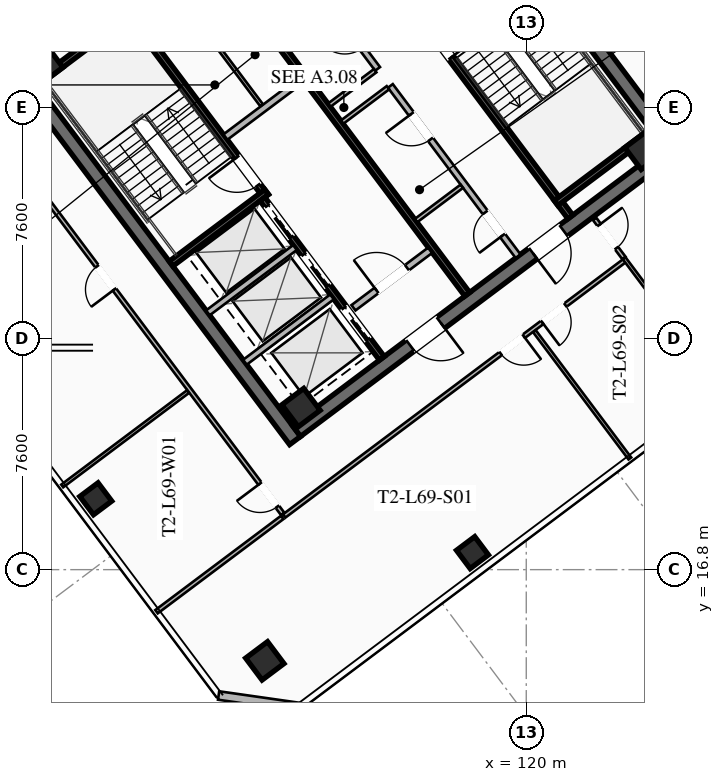
"""IFC4 building model, lengths in metres.
Left out: names, types, materials, properties, quantities, classifications, styles, units other than length and angle.
Written with IfcOpenShell. Run it as: python <this file> out.ifc"""

import sys

from ifc_helpers import new_model, si_unit, direction, frame, frame_2d, origin, origin_2d, place, context, subcontext, project, spatial, rectangle, hollow_rectangle, extrude, element, fill, save


model = new_model("IFC4")
c1 = context("Model", 3, precision=1e-05, world=origin(), true_north=direction((0.0, 1.0)))
c2 = subcontext(c1, "Body", "Model", "MODEL_VIEW")
j1 = project(units=[si_unit("LENGTHUNIT", "METRE"), si_unit("PLANEANGLEUNIT", "RADIAN")], contexts=[c1])
p1 = place(None, origin())
s1 = spatial("IfcSite", under=j1, at=p1, CompositionType="ELEMENT")
p2 = place(p1, origin())
s2 = spatial("IfcBuilding", under=s1, at=p2, CompositionType="ELEMENT")
p3 = place(p2, frame((0.0, 0.0, 255.4)))
s3 = spatial("IfcBuildingStorey", under=s2, at=p3, CompositionType="ELEMENT", Elevation=255.4)
for number, where, z_axis, x_axis in (
    (1, (112.396, 21.047, 0.0), (0.0, 0.0, 1.0), (-0.6, 0.8, 0.0)),
    (2, (115.604, 42.953, 0.0), (0.0, 0.0, 1.0), (0.6, -0.8, 0.0)),
):
    element("IfcWall", number, at=place(p3, frame(where, z_axis=z_axis, x_axis=x_axis)), inside=s3, PredefinedType="SHEAR", context=c2, shape_type="SweptSolid", body=[
        extrude(rectangle(XDim=15.6, YDim=0.45, at=frame_2d((7.8, 0.0))), origin(), (0.0, 0.0, 1.0), 4.0),
    ])
p4 = place(p3, frame((124.649, 30.518, 0.0), z_axis=(0.0, 0.0, 1.0), x_axis=(-0.8, -0.6, 0.0)))
e3 = element("IfcWall", 3, at=p4, inside=s3, PredefinedType="SHEAR", context=c2, shape_type="SweptSolid", body=[
    extrude(rectangle(XDim=15.26, YDim=0.45, at=frame_2d((7.63, 0.0))), origin(), (0.0, 0.0, 1.0), 4.0),
])
p5 = place(p4, frame((9.33, 0.0, 0.0)))
e4 = element("IfcOpeningElement", 4, at=p5, cuts=e3, PredefinedType="OPENING", context=c2, shape_type="SweptSolid", body=[
    extrude(rectangle(XDim=1.25, YDim=2.25, at=frame_2d((0.625, 1.125))), frame((0.0, 0.235, 0.0), z_axis=(0.0, -1.0, 0.0), x_axis=(1.0, 0.0, 0.0)), (0.0, 0.0, 1.0), 0.47),
])
p6 = place(p4, frame((4.28, 0.0, 0.0)))
e5 = element("IfcOpeningElement", 5, at=p6, cuts=e3, PredefinedType="OPENING", context=c2, shape_type="SweptSolid", body=[
    extrude(rectangle(XDim=1.25, YDim=2.25, at=frame_2d((0.625, 1.125))), frame((0.0, 0.235, 0.0), z_axis=(0.0, -1.0, 0.0), x_axis=(1.0, 0.0, 0.0)), (0.0, 0.0, 1.0), 0.47),
])
p7 = place(p3, frame((103.351, 33.482, 0.0), z_axis=(0.0, 0.0, 1.0), x_axis=(0.8, 0.6, 0.0)))
e6 = element("IfcWall", 6, at=p7, inside=s3, PredefinedType="SHEAR", context=c2, shape_type="SweptSolid", body=[
    extrude(rectangle(XDim=15.26, YDim=0.45, at=frame_2d((7.63, 0.0))), origin(), (0.0, 0.0, 1.0), 4.0),
])
p8 = place(p7, frame((4.68, 0.0, 0.0)))
e7 = element("IfcOpeningElement", 7, at=p8, cuts=e6, PredefinedType="OPENING", context=c2, shape_type="SweptSolid", body=[
    extrude(rectangle(XDim=1.25, YDim=2.25, at=frame_2d((0.625, 1.125))), frame((0.0, 0.235, 0.0), z_axis=(0.0, -1.0, 0.0), x_axis=(1.0, 0.0, 0.0)), (0.0, 0.0, 1.0), 0.47),
])
p9 = place(p7, frame((9.73, 0.0, 0.0)))
e8 = element("IfcOpeningElement", 8, at=p9, cuts=e6, PredefinedType="OPENING", context=c2, shape_type="SweptSolid", body=[
    extrude(rectangle(XDim=1.25, YDim=2.25, at=frame_2d((0.625, 1.125))), frame((0.0, 0.235, 0.0), z_axis=(0.0, -1.0, 0.0), x_axis=(1.0, 0.0, 0.0)), (0.0, 0.0, 1.0), 0.47),
])
for number, where, z_axis, x_axis in (
    (9, (112.59, 22.13, 0.0), (0.0, 0.0, 1.0), (0.8, 0.6, 0.0)),
    (10, (123.87, 30.59, 0.0), (0.0, 0.0, 1.0), (0.8, 0.6, 0.0)),
    (11, (104.13, 33.41, 0.0), (0.0, 0.0, 1.0), (0.8, 0.6, 0.0)),
    (12, (111.4, 13.8, 0.0), (0.0, 0.0, 1.0), (0.8, 0.6, 0.0)),
):
    element("IfcColumn", number, at=place(p3, frame(where, z_axis=z_axis, x_axis=x_axis)), inside=s3, PredefinedType="COLUMN", context=c2, shape_type="SweptSolid", body=[
        extrude(hollow_rectangle(XDim=0.9, YDim=0.9, WallThickness=0.04, at=origin_2d()), origin(), (0.0, 0.0, 1.0), 3.78),
    ])
for number, where, z_axis, x_axis in (
    (13, (118.23, 17.36, 0.0), (0.0, 0.0, 1.0), (0.8, 0.6, 0.0)),
    (14, (105.84, 19.13, 0.0), (0.0, 0.0, 1.0), (0.8, 0.6, 0.0)),
):
    element("IfcColumn", number, at=place(p3, frame(where, z_axis=z_axis, x_axis=x_axis)), inside=s3, PredefinedType="COLUMN", context=c2, shape_type="SweptSolid", body=[
        extrude(hollow_rectangle(XDim=0.75, YDim=0.75, WallThickness=0.032, at=origin_2d()), origin(), (0.0, 0.0, 1.0), 3.78),
    ])
p10 = place(p3, frame((112.54, 12.28, 0.0), z_axis=(0.0, 0.0, 1.0), x_axis=(-0.989956760759, 0.141370477216, 0.0)))
e15 = element("IfcWall", 15, at=p10, inside=s3, PredefinedType="SOLIDWALL", context=c2, shape_type="SweptSolid", body=[
    extrude(rectangle(XDim=2.687, YDim=0.28, at=frame_2d((1.344, 0.0))), origin(), (0.0, 0.0, 1.0), 3.78),
])
p11 = place(p3, frame((111.44, 29.08, 0.0), z_axis=(0.0, 0.0, 1.0), x_axis=(-0.59999041401, 0.800007189403, 0.0)))
e16 = element("IfcWall", 16, at=p11, inside=s3, PredefinedType="SHEAR", context=c2, shape_type="SweptSolid", body=[
    extrude(rectangle(XDim=8.15, YDim=0.2, at=frame_2d((4.075, 0.0))), origin(), (0.0, 0.0, 1.0), 3.78),
])
p12 = place(p11, frame((0.45, 0.0, 0.0)))
e17 = element("IfcOpeningElement", 17, at=p12, cuts=e16, PredefinedType="OPENING", context=c2, shape_type="SweptSolid", body=[
    extrude(rectangle(XDim=1.15, YDim=2.2, at=frame_2d((0.575, 1.1))), frame((0.0, 0.11, 0.0), z_axis=(0.0, -1.0, 0.0), x_axis=(1.0, 0.0, 0.0)), (0.0, 0.0, 1.0), 0.22),
])
for number, where, z_axis, x_axis in (
    (18, (108.316, 26.862, 0.0), (0.0, 0.0, 1.0), (0.8, 0.6, 0.0)),
    (19, (103.876, 32.782, 0.0), (0.0, 0.0, 1.0), (0.8, 0.6, 0.0)),
):
    element("IfcWall", number, at=place(p3, frame(where, z_axis=z_axis, x_axis=x_axis)), inside=s3, PredefinedType="SHEAR", context=c2, shape_type="SweptSolid", body=[
        extrude(rectangle(XDim=3.93, YDim=0.2, at=frame_2d((1.965, 0.0))), origin(), (0.0, 0.0, 1.0), 3.78),
    ])
p13 = place(p3, frame((116.56, 34.92, 0.0), z_axis=(0.0, 0.0, 1.0), x_axis=(0.59999041401, -0.800007189403, 0.0)))
e20 = element("IfcWall", 20, at=p13, inside=s3, PredefinedType="SHEAR", context=c2, shape_type="SweptSolid", body=[
    extrude(rectangle(XDim=8.15, YDim=0.2, at=frame_2d((4.075, 0.0))), origin(), (0.0, 0.0, 1.0), 3.78),
])
p14 = place(p13, frame((0.45, 0.0, 0.0)))
e21 = element("IfcOpeningElement", 21, at=p14, cuts=e20, PredefinedType="OPENING", context=c2, shape_type="SweptSolid", body=[
    extrude(rectangle(XDim=1.15, YDim=2.2, at=frame_2d((0.575, 1.1))), frame((0.0, 0.11, 0.0), z_axis=(0.0, -1.0, 0.0), x_axis=(1.0, 0.0, 0.0)), (0.0, 0.0, 1.0), 0.22),
])
p15 = place(p3, frame((120.98, 28.86, 0.0), z_axis=(0.0, 0.0, 1.0), x_axis=(0.800014909178, 0.599980120581, 0.0)))
e22 = element("IfcWall", 22, at=p15, inside=s3, PredefinedType="SHEAR", context=c2, shape_type="SweptSolid", body=[
    extrude(rectangle(XDim=3.93, YDim=0.2, at=frame_2d((1.965, 0.0))), origin(), (0.0, 0.0, 1.0), 3.78),
])
p16 = place(p3, frame((118.058, 25.856, 0.0), z_axis=(0.0, 0.0, 1.0), x_axis=(-0.600002657301, 0.799998007018, 0.0)))
e23 = element("IfcWall", 23, at=p16, inside=s3, PredefinedType="SHEAR", context=c2, shape_type="SweptSolid", body=[
    extrude(rectangle(XDim=14.7, YDim=0.2, at=frame_2d((7.35, 0.0))), origin(), (0.0, 0.0, 1.0), 3.78),
])
p17 = place(p3, frame((110.104, 31.028, 0.0), z_axis=(0.0, 0.0, 1.0), x_axis=(0.800018601094, 0.59997519774, 0.0)))
e24 = element("IfcWall", 24, at=p17, inside=s3, PredefinedType="SOLIDWALL", context=c2, shape_type="SweptSolid", body=[
    extrude(rectangle(XDim=3.15, YDim=0.22, at=frame_2d((1.575, 0.0))), origin(), (0.0, 0.0, 1.0), 2.971),
])
p18 = place(p3, frame((114.316, 25.412, 0.0), z_axis=(0.0, 0.0, 1.0), x_axis=(0.800018601094, 0.59997519774, 0.0)))
e25 = element("IfcWall", 25, at=p18, inside=s3, PredefinedType="SOLIDWALL", context=c2, shape_type="SweptSolid", body=[
    extrude(rectangle(XDim=3.15, YDim=0.22, at=frame_2d((1.575, 0.0))), origin(), (0.0, 0.0, 1.0), 2.971),
])
p19 = place(p18, frame((0.95, 0.0, 0.0)))
e26 = element("IfcOpeningElement", 26, at=p19, cuts=e25, PredefinedType="OPENING", context=c2, shape_type="SweptSolid", body=[
    extrude(rectangle(XDim=1.25, YDim=2.25, at=frame_2d((0.625, 1.125))), frame((0.0, 0.12, 0.0), z_axis=(0.0, -1.0, 0.0), x_axis=(1.0, 0.0, 0.0)), (0.0, 0.0, 1.0), 0.24),
])
p20 = place(p3, frame((115.25, 23.75, 0.0), z_axis=(0.0, 0.0, 1.0), x_axis=(-0.599994036198, 0.800004472816, 0.0)))
e27 = element("IfcWall", 27, at=p20, inside=s3, PredefinedType="SHEAR", context=c2, shape_type="SweptSolid", body=[
    extrude(rectangle(XDim=6.55, YDim=0.2, at=frame_2d((3.275, 0.0))), origin(), (0.0, 0.0, 1.0), 3.78),
])
p21 = place(p20, frame((4.975, 0.0, 0.0)))
e28 = element("IfcOpeningElement", 28, at=p21, cuts=e27, PredefinedType="OPENING", context=c2, shape_type="SweptSolid", body=[
    extrude(rectangle(XDim=1.3, YDim=2.25, at=frame_2d((0.65, 1.125))), frame((0.0, 0.11, 0.0), z_axis=(0.0, -1.0, 0.0), x_axis=(1.0, 0.0, 0.0)), (0.0, 0.0, 1.0), 0.22),
])
p22 = place(p20, frame((2.975, 0.0, 0.0)))
e29 = element("IfcOpeningElement", 29, at=p22, cuts=e27, PredefinedType="OPENING", context=c2, shape_type="SweptSolid", body=[
    extrude(rectangle(XDim=1.3, YDim=2.25, at=frame_2d((0.65, 1.125))), frame((0.0, 0.11, 0.0), z_axis=(0.0, -1.0, 0.0), x_axis=(1.0, 0.0, 0.0)), (0.0, 0.0, 1.0), 0.22),
])
p23 = place(p20, frame((0.775, 0.0, 0.0)))
e30 = element("IfcOpeningElement", 30, at=p23, cuts=e27, PredefinedType="OPENING", context=c2, shape_type="SweptSolid", body=[
    extrude(rectangle(XDim=1.3, YDim=2.25, at=frame_2d((0.65, 1.125))), frame((0.0, 0.11, 0.0), z_axis=(0.0, -1.0, 0.0), x_axis=(1.0, 0.0, 0.0)), (0.0, 0.0, 1.0), 0.22),
])
for number, where, z_axis, x_axis in (
    (31, (110.746, 23.622, 0.0), (0.0, 0.0, 1.0), (0.8, 0.6, 0.0)),
    (32, (109.528, 25.246, 0.0), (0.0, 0.0, 1.0), (0.8, 0.6, 0.0)),
):
    element("IfcWall", number, at=place(p3, frame(where, z_axis=z_axis, x_axis=x_axis)), inside=s3, PredefinedType="SOLIDWALL", context=c2, shape_type="SweptSolid", body=[
        extrude(rectangle(XDim=3.58, YDim=0.2, at=frame_2d((1.79, 0.0))), origin(), (0.0, 0.0, 1.0), 3.78),
    ])
p24 = place(p3, frame((111.296, 32.072, 0.0), z_axis=(0.0, 0.0, 1.0), x_axis=(-0.59995887973, 0.800030838552, 0.0)))
e33 = element("IfcWall", 33, at=p24, inside=s3, PredefinedType="PARTITIONING", context=c2, shape_type="SweptSolid", body=[
    extrude(rectangle(XDim=3.8, YDim=0.11, at=frame_2d((1.9, 0.0))), origin(), (0.0, 0.0, 1.0), 2.971),
])
p25 = place(p3, frame((119.73, 27.11, 0.0), z_axis=(0.0, 0.0, 1.0), x_axis=(-0.600005580459, 0.799995814625, 0.0)))
e34 = element("IfcWall", 34, at=p25, inside=s3, PredefinedType="SOLIDWALL", context=c2, shape_type="SweptSolid", body=[
    extrude(rectangle(XDim=7.0, YDim=0.2, at=frame_2d((3.5, 0.0))), origin(), (0.0, 0.0, 1.0), 2.971),
])
p26 = place(p25, frame((0.85, 0.0, 0.0)))
e35 = element("IfcOpeningElement", 35, at=p26, cuts=e34, PredefinedType="OPENING", context=c2, shape_type="SweptSolid", body=[
    extrude(rectangle(XDim=0.95, YDim=2.05, at=frame_2d((0.475, 1.025))), frame((0.0, 0.11, 0.0), z_axis=(0.0, -1.0, 0.0), x_axis=(1.0, 0.0, 0.0)), (0.0, 0.0, 1.0), 0.22),
])
p27 = place(p25, frame((4.8, 0.0, 0.0)))
e36 = element("IfcOpeningElement", 36, at=p27, cuts=e34, PredefinedType="OPENING", context=c2, shape_type="SweptSolid", body=[
    extrude(rectangle(XDim=1.05, YDim=2.2, at=frame_2d((0.525, 1.1))), frame((0.0, 0.11, 0.0), z_axis=(0.0, -1.0, 0.0), x_axis=(1.0, 0.0, 0.0)), (0.0, 0.0, 1.0), 0.22),
])
for number, where, z_axis, x_axis in (
    (37, (113.946, 31.522, 0.0), (0.0, 0.0, 1.0), (0.8, 0.6, 0.0)),
    (38, (116.376, 28.282, 0.0), (0.0, 0.0, 1.0), (0.8, 0.6, 0.0)),
):
    element("IfcWall", number, at=place(p3, frame(where, z_axis=z_axis, x_axis=x_axis)), inside=s3, PredefinedType="PARTITIONING", context=c2, shape_type="SweptSolid", body=[
        extrude(rectangle(XDim=1.88, YDim=0.135, at=frame_2d((0.94, 0.0))), origin(), (0.0, 0.0, 1.0), 2.971),
    ])
p28 = place(p3, frame((115.11, 33.27, 0.0), z_axis=(0.0, 0.0, 1.0), x_axis=(-0.600011160345, 0.79999162962, 0.0)))
e39 = element("IfcWall", 39, at=p28, inside=s3, PredefinedType="SOLIDWALL", context=c2, shape_type="SweptSolid", body=[
    extrude(rectangle(XDim=7.0, YDim=0.2, at=frame_2d((3.5, 0.0))), origin(), (0.0, 0.0, 1.0), 2.971),
])
p29 = place(p28, frame((0.85, 0.0, 0.0)))
e40 = element("IfcOpeningElement", 40, at=p29, cuts=e39, PredefinedType="OPENING", context=c2, shape_type="SweptSolid", body=[
    extrude(rectangle(XDim=0.95, YDim=2.05, at=frame_2d((0.475, 1.025))), frame((0.0, 0.11, 0.0), z_axis=(0.0, -1.0, 0.0), x_axis=(1.0, 0.0, 0.0)), (0.0, 0.0, 1.0), 0.22),
])
p30 = place(p28, frame((4.85, 0.0, 0.0)))
e41 = element("IfcOpeningElement", 41, at=p30, cuts=e39, PredefinedType="OPENING", context=c2, shape_type="SweptSolid", body=[
    extrude(rectangle(XDim=0.95, YDim=2.05, at=frame_2d((0.475, 1.025))), frame((0.0, 0.11, 0.0), z_axis=(0.0, -1.0, 0.0), x_axis=(1.0, 0.0, 0.0)), (0.0, 0.0, 1.0), 0.22),
])
p31 = place(p3, frame((113.526, 32.082, 0.0), z_axis=(0.0, 0.0, 1.0), x_axis=(0.800046745961, 0.599937666993, 0.0)))
e42 = element("IfcWall", 42, at=p31, inside=s3, PredefinedType="PARTITIONING", context=c2, shape_type="SweptSolid", body=[
    extrude(rectangle(XDim=1.88, YDim=0.135, at=frame_2d((0.94, 0.0))), origin(), (0.0, 0.0, 1.0), 2.971),
])
p32 = place(p3, frame((123.262, 26.984, 0.0), z_axis=(0.0, 0.0, 1.0), x_axis=(-0.799997911818, -0.600002784232, 0.0)))
e43 = element("IfcWall", 43, at=p32, inside=s3, PredefinedType="PARTITIONING", context=c2, shape_type="SweptSolid", body=[
    extrude(rectangle(XDim=14.03, YDim=0.135, at=frame_2d((7.015, 0.0))), origin(), (0.0, 0.0, 1.0), 2.971),
])
p33 = place(p32, frame((4.18, 0.0, 0.0)))
e44 = element("IfcOpeningElement", 44, at=p33, cuts=e43, PredefinedType="OPENING", context=c2, shape_type="SweptSolid", body=[
    extrude(rectangle(XDim=0.95, YDim=2.05, at=frame_2d((0.475, 1.025))), frame((0.0, 0.077, 0.0), z_axis=(0.0, -1.0, 0.0), x_axis=(1.0, 0.0, 0.0)), (0.0, 0.0, 1.0), 0.155),
])
p34 = place(p32, frame((2.47, 0.0, 0.0)))
e45 = element("IfcOpeningElement", 45, at=p34, cuts=e43, PredefinedType="OPENING", context=c2, shape_type="SweptSolid", body=[
    extrude(rectangle(XDim=0.95, YDim=2.05, at=frame_2d((0.475, 1.025))), frame((0.0, 0.077, 0.0), z_axis=(0.0, -1.0, 0.0), x_axis=(1.0, 0.0, 0.0)), (0.0, 0.0, 1.0), 0.155),
])
p35 = place(p3, frame((122.248, 28.336, 0.0), z_axis=(0.0, 0.0, 1.0), x_axis=(0.600072788757, -0.799945403258, 0.0)))
e46 = element("IfcWall", 46, at=p35, inside=s3, PredefinedType="PARTITIONING", context=c2, shape_type="SweptSolid", body=[
    extrude(rectangle(XDim=1.61, YDim=0.135, at=frame_2d((0.805, 0.0))), origin(), (0.0, 0.0, 1.0), 2.971),
])
p36 = place(p35, frame((0.25, 0.0, 0.0)))
e47 = element("IfcOpeningElement", 47, at=p36, cuts=e46, PredefinedType="OPENING", context=c2, shape_type="SweptSolid", body=[
    extrude(rectangle(XDim=0.95, YDim=2.05, at=frame_2d((0.475, 1.025))), frame((0.0, 0.077, 0.0), z_axis=(0.0, -1.0, 0.0), x_axis=(1.0, 0.0, 0.0)), (0.0, 0.0, 1.0), 0.155),
])
p37 = place(p3, frame((123.408, 20.456, 0.0), z_axis=(0.0, 0.0, 1.0), x_axis=(-0.60000746914, 0.79999439809, 0.0)))
e48 = element("IfcWall", 48, at=p37, inside=s3, PredefinedType="PARTITIONING", context=c2, shape_type="SweptSolid", body=[
    extrude(rectangle(XDim=5.23, YDim=0.11, at=frame_2d((2.615, 0.0))), origin(), (0.0, 0.0, 1.0), 2.971),
])
p38 = place(p3, frame((126.448, 22.736, 0.0), z_axis=(0.0, 0.0, 1.0), x_axis=(-0.59998550531, 0.800010870812, 0.0)))
e49 = element("IfcWall", 49, at=p38, inside=s3, PredefinedType="PARTITIONING", context=c2, shape_type="SweptSolid", body=[
    extrude(rectangle(XDim=5.39, YDim=0.11, at=frame_2d((2.695, 0.0))), origin(), (0.0, 0.0, 1.0), 2.971),
])
p39 = place(p3, frame((111.99, 18.63, 0.0), z_axis=(0.0, 0.0, 1.0), x_axis=(-0.599997997836, 0.800001501619, 0.0)))
e50 = element("IfcWall", 50, at=p39, inside=s3, PredefinedType="PARTITIONING", context=c2, shape_type="SweptSolid", body=[
    extrude(rectangle(XDim=19.51, YDim=0.135, at=frame_2d((9.755, 0.0))), origin(), (0.0, 0.0, 1.0), 2.971),
])
p40 = place(p39, frame((0.3, 0.0, 0.0)))
e51 = element("IfcOpeningElement", 51, at=p40, cuts=e50, PredefinedType="OPENING", context=c2, shape_type="SweptSolid", body=[
    extrude(rectangle(XDim=0.95, YDim=2.05, at=frame_2d((0.475, 1.025))), frame((0.0, 0.077, 0.0), z_axis=(0.0, -1.0, 0.0), x_axis=(1.0, 0.0, 0.0)), (0.0, 0.0, 1.0), 0.155),
])
p41 = place(p39, frame((9.232, 0.0, 0.0)))
e52 = element("IfcOpeningElement", 52, at=p41, cuts=e50, PredefinedType="OPENING", context=c2, shape_type="SweptSolid", body=[
    extrude(rectangle(XDim=0.95, YDim=2.05, at=frame_2d((0.475, 1.025))), frame((0.0, 0.077, 0.0), z_axis=(0.0, -1.0, 0.0), x_axis=(1.0, 0.0, 0.0)), (0.0, 0.0, 1.0), 0.155),
])
p42 = place(p3, frame((107.838, 15.416, 0.0), z_axis=(0.0, 0.0, 1.0), x_axis=(0.8000113328, 0.599984889302, 0.0)))
e53 = element("IfcWall", 53, at=p42, inside=s3, PredefinedType="PARTITIONING", context=c2, shape_type="SweptSolid", body=[
    extrude(rectangle(XDim=5.17, YDim=0.135, at=frame_2d((2.585, 0.0))), origin(), (0.0, 0.0, 1.0), 2.971),
])
p43 = place(p3, frame((104.736, 19.552, 0.0), z_axis=(0.0, 0.0, 1.0), x_axis=(0.799994333279, 0.600007555554, 0.0)))
e54 = element("IfcWall", 54, at=p43, inside=s3, PredefinedType="PARTITIONING", context=c2, shape_type="SweptSolid", body=[
    extrude(rectangle(XDim=5.17, YDim=0.11, at=frame_2d((2.585, 0.0))), origin(), (0.0, 0.0, 1.0), 2.971),
])
p44 = place(p5, origin())
e55 = element("IfcDoor", 55, at=p44, inside=s3, OperationType="SINGLE_SWING_LEFT", PredefinedType="DOOR", context=c2, shape_type="SweptSolid", body=[
    extrude(rectangle(XDim=1.25, YDim=2.25, at=frame_2d((0.625, 1.125))), frame((0.0, 0.025, 0.0), z_axis=(0.0, -1.0, 0.0), x_axis=(1.0, 0.0, 0.0)), (0.0, 0.0, 1.0), 0.05),
])
fill(e4, e55)
p45 = place(p6, origin())
e56 = element("IfcDoor", 56, at=p45, inside=s3, OperationType="SINGLE_SWING_RIGHT", PredefinedType="DOOR", context=c2, shape_type="SweptSolid", body=[
    extrude(rectangle(XDim=1.25, YDim=2.25, at=frame_2d((0.625, 1.125))), frame((0.0, 0.025, 0.0), z_axis=(0.0, -1.0, 0.0), x_axis=(1.0, 0.0, 0.0)), (0.0, 0.0, 1.0), 0.05),
])
fill(e5, e56)
p46 = place(p12, origin())
e57 = element("IfcDoor", 57, at=p46, inside=s3, OperationType="SINGLE_SWING_RIGHT", PredefinedType="DOOR", context=c2, shape_type="SweptSolid", body=[
    extrude(rectangle(XDim=1.15, YDim=2.2, at=frame_2d((0.575, 1.1))), frame((0.0, 0.025, 0.0), z_axis=(0.0, -1.0, 0.0), x_axis=(1.0, 0.0, 0.0)), (0.0, 0.0, 1.0), 0.05),
])
fill(e17, e57)
p47 = place(p14, origin())
e58 = element("IfcDoor", 58, at=p47, inside=s3, OperationType="SINGLE_SWING_RIGHT", PredefinedType="DOOR", context=c2, shape_type="SweptSolid", body=[
    extrude(rectangle(XDim=1.15, YDim=2.2, at=frame_2d((0.575, 1.1))), frame((0.0, 0.025, 0.0), z_axis=(0.0, -1.0, 0.0), x_axis=(1.0, 0.0, 0.0)), (0.0, 0.0, 1.0), 0.05),
])
fill(e21, e58)
p48 = place(p19, origin())
e59 = element("IfcDoor", 59, at=p48, inside=s3, OperationType="SINGLE_SWING_LEFT", PredefinedType="DOOR", context=c2, shape_type="SweptSolid", body=[
    extrude(rectangle(XDim=1.25, YDim=2.25, at=frame_2d((0.625, 1.125))), frame((0.0, 0.025, 0.0), z_axis=(0.0, -1.0, 0.0), x_axis=(1.0, 0.0, 0.0)), (0.0, 0.0, 1.0), 0.05),
])
fill(e26, e59)
p49 = place(p26, origin())
e60 = element("IfcDoor", 60, at=p49, inside=s3, OperationType="SINGLE_SWING_LEFT", PredefinedType="DOOR", context=c2, shape_type="SweptSolid", body=[
    extrude(rectangle(XDim=0.95, YDim=2.05, at=frame_2d((0.475, 1.025))), frame((0.0, 0.025, 0.0), z_axis=(0.0, -1.0, 0.0), x_axis=(1.0, 0.0, 0.0)), (0.0, 0.0, 1.0), 0.05),
])
fill(e35, e60)
p50 = place(p27, origin())
e61 = element("IfcDoor", 61, at=p50, inside=s3, OperationType="SINGLE_SWING_RIGHT", PredefinedType="DOOR", context=c2, shape_type="SweptSolid", body=[
    extrude(rectangle(XDim=1.05, YDim=2.2, at=frame_2d((0.525, 1.1))), frame((0.0, 0.025, 0.0), z_axis=(0.0, -1.0, 0.0), x_axis=(1.0, 0.0, 0.0)), (0.0, 0.0, 1.0), 0.05),
])
fill(e36, e61)
p51 = place(p33, origin())
e62 = element("IfcDoor", 62, at=p51, inside=s3, OperationType="SINGLE_SWING_LEFT", PredefinedType="DOOR", context=c2, shape_type="SweptSolid", body=[
    extrude(rectangle(XDim=0.95, YDim=2.05, at=frame_2d((0.475, 1.025))), frame((0.0, 0.025, 0.0), z_axis=(0.0, -1.0, 0.0), x_axis=(1.0, 0.0, 0.0)), (0.0, 0.0, 1.0), 0.05),
])
fill(e44, e62)
p52 = place(p34, origin())
e63 = element("IfcDoor", 63, at=p52, inside=s3, OperationType="SINGLE_SWING_RIGHT", PredefinedType="DOOR", context=c2, shape_type="SweptSolid", body=[
    extrude(rectangle(XDim=0.95, YDim=2.05, at=frame_2d((0.475, 1.025))), frame((0.0, 0.025, 0.0), z_axis=(0.0, -1.0, 0.0), x_axis=(1.0, 0.0, 0.0)), (0.0, 0.0, 1.0), 0.05),
])
fill(e45, e63)
p53 = place(p36, origin())
e64 = element("IfcDoor", 64, at=p53, inside=s3, OperationType="SINGLE_SWING_LEFT", PredefinedType="DOOR", context=c2, shape_type="SweptSolid", body=[
    extrude(rectangle(XDim=0.95, YDim=2.05, at=frame_2d((0.475, 1.025))), frame((0.0, 0.025, 0.0), z_axis=(0.0, -1.0, 0.0), x_axis=(1.0, 0.0, 0.0)), (0.0, 0.0, 1.0), 0.05),
])
fill(e47, e64)
p54 = place(p40, origin())
e65 = element("IfcDoor", 65, at=p54, inside=s3, OperationType="SINGLE_SWING_RIGHT", PredefinedType="DOOR", context=c2, shape_type="SweptSolid", body=[
    extrude(rectangle(XDim=0.95, YDim=2.05, at=frame_2d((0.475, 1.025))), frame((0.0, 0.025, 0.0), z_axis=(0.0, -1.0, 0.0), x_axis=(1.0, 0.0, 0.0)), (0.0, 0.0, 1.0), 0.05),
])
fill(e51, e65)
p55 = place(p41, origin())
e66 = element("IfcDoor", 66, at=p55, inside=s3, OperationType="SINGLE_SWING_LEFT", PredefinedType="DOOR", context=c2, shape_type="SweptSolid", body=[
    extrude(rectangle(XDim=0.95, YDim=2.05, at=frame_2d((0.475, 1.025))), frame((0.0, 0.025, 0.0), z_axis=(0.0, -1.0, 0.0), x_axis=(1.0, 0.0, 0.0)), (0.0, 0.0, 1.0), 0.05),
])
fill(e52, e66)
p56 = place(p21, origin())
e67 = element("IfcDoor", 67, at=p56, inside=s3, OperationType="SLIDING_TO_LEFT", PredefinedType="DOOR", context=c2, shape_type="SweptSolid", body=[
    extrude(rectangle(XDim=1.3, YDim=2.25, at=frame_2d((0.65, 1.125))), frame((0.0, 0.025, 0.0), z_axis=(0.0, -1.0, 0.0), x_axis=(1.0, 0.0, 0.0)), (0.0, 0.0, 1.0), 0.05),
])
fill(e28, e67)
p57 = place(p22, origin())
e68 = element("IfcDoor", 68, at=p57, inside=s3, OperationType="SLIDING_TO_LEFT", PredefinedType="DOOR", context=c2, shape_type="SweptSolid", body=[
    extrude(rectangle(XDim=1.3, YDim=2.25, at=frame_2d((0.65, 1.125))), frame((0.0, 0.025, 0.0), z_axis=(0.0, -1.0, 0.0), x_axis=(1.0, 0.0, 0.0)), (0.0, 0.0, 1.0), 0.05),
])
fill(e29, e68)
p58 = place(p23, origin())
e69 = element("IfcDoor", 69, at=p58, inside=s3, OperationType="SLIDING_TO_LEFT", PredefinedType="DOOR", context=c2, shape_type="SweptSolid", body=[
    extrude(rectangle(XDim=1.3, YDim=2.25, at=frame_2d((0.65, 1.125))), frame((0.0, 0.025, 0.0), z_axis=(0.0, -1.0, 0.0), x_axis=(1.0, 0.0, 0.0)), (0.0, 0.0, 1.0), 0.05),
])
fill(e30, e69)
save(model, sys.argv[1])
